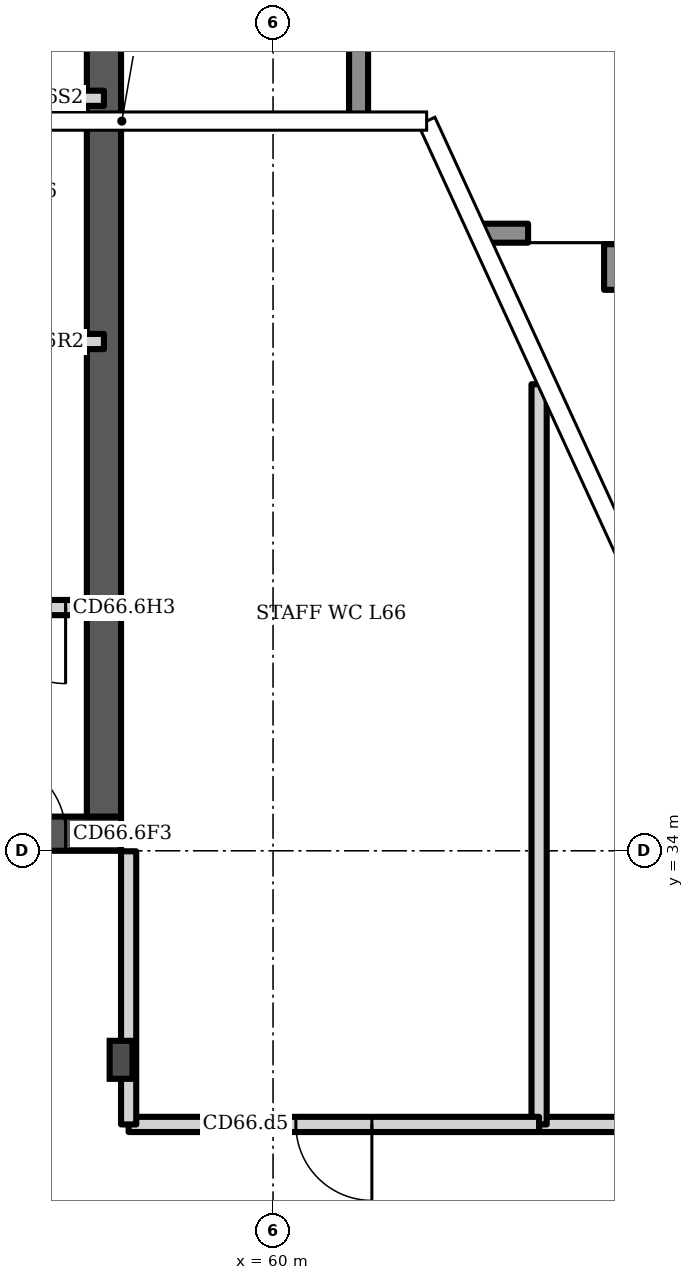
"""IFC4 building model, lengths in metres.
Left out: names, types, materials, properties, quantities, classifications, styles, units other than length and angle.
Written with IfcOpenShell. Run it as: python <this file> out.ifc"""

import sys

from ifc_helpers import new_model, si_unit, direction, frame, frame_2d, origin, origin_2d, place, context, subcontext, project, spatial, polyline, rectangle, i_section, outline, extrude, element, fill, save


model = new_model("IFC4")
c1 = context("Model", 3, precision=1e-05, world=origin(), true_north=direction((0.0, 1.0)))
c2 = subcontext(c1, "Body", "Model", "MODEL_VIEW")
j1 = project(units=[si_unit("LENGTHUNIT", "METRE"), si_unit("PLANEANGLEUNIT", "RADIAN")], contexts=[c1])
p1 = place(None, origin())
s1 = spatial("IfcSite", under=j1, at=p1, CompositionType="ELEMENT")
p2 = place(p1, origin())
s2 = spatial("IfcBuilding", under=s1, at=p2, CompositionType="ELEMENT")
p3 = place(p2, frame((0.0, 0.0, 261.1)))
s3 = spatial("IfcBuildingStorey", under=s2, at=p3, CompositionType="ELEMENT", Elevation=261.1)
p4 = place(p3, frame((23.0, 34.225, 0.0), z_axis=(0.0, 0.0, 1.0), x_axis=(1.0, 0.0, 0.0)))
e1 = element("IfcWall", 1, at=p4, inside=s3, PredefinedType="SHEAR", context=c2, shape_type="SweptSolid", body=[
    extrude(outline(polyline([(0.0, 0.0), (35.0, 0.0), (35.0, 3.2), (30.625, 3.2), (26.25, 3.2), (21.875, 3.2), (17.5, 3.2), (13.125, 3.2), (8.75, 3.2), (4.375, 3.2), (0.0, 2.365), (0.0, 0.0)])), frame((0.0, 0.225, 0.0), z_axis=(0.0, -1.0, 0.0), x_axis=(1.0, 0.0, 0.0)), (0.0, 0.0, 1.0), 0.45),
])
p5 = place(p4, frame((0.65, 0.0, 0.0)))
e2 = element("IfcOpeningElement", 2, at=p5, cuts=e1, PredefinedType="OPENING", context=c2, shape_type="SweptSolid", body=[
    extrude(rectangle(XDim=1.2, YDim=2.1, at=frame_2d((0.6, 1.05))), frame((0.0, 0.235, 0.0), z_axis=(0.0, -1.0, 0.0), x_axis=(1.0, 0.0, 0.0)), (0.0, 0.0, 1.0), 0.47),
])
p6 = place(p4, frame((7.679, 0.0, 0.0)))
e3 = element("IfcOpeningElement", 3, at=p6, cuts=e1, PredefinedType="OPENING", context=c2, shape_type="SweptSolid", body=[
    extrude(rectangle(XDim=1.1, YDim=2.1, at=frame_2d((0.55, 1.05))), frame((0.0, 0.235, 0.0), z_axis=(0.0, -1.0, 0.0), x_axis=(1.0, 0.0, 0.0)), (0.0, 0.0, 1.0), 0.47),
])
p7 = place(p4, frame((12.221, 0.0, 0.0)))
e4 = element("IfcOpeningElement", 4, at=p7, cuts=e1, PredefinedType="OPENING", context=c2, shape_type="SweptSolid", body=[
    extrude(rectangle(XDim=1.1, YDim=2.1, at=frame_2d((0.55, 1.05))), frame((0.0, 0.235, 0.0), z_axis=(0.0, -1.0, 0.0), x_axis=(1.0, 0.0, 0.0)), (0.0, 0.0, 1.0), 0.47),
])
p8 = place(p4, frame((9.8, 0.0, 0.0)))
e5 = element("IfcOpeningElement", 5, at=p8, cuts=e1, PredefinedType="OPENING", context=c2, shape_type="SweptSolid", body=[
    extrude(rectangle(XDim=1.4, YDim=2.1, at=frame_2d((0.7, 1.05))), frame((0.0, 0.235, 0.0), z_axis=(0.0, -1.0, 0.0), x_axis=(1.0, 0.0, 0.0)), (0.0, 0.0, 1.0), 0.47),
])
p9 = place(p4, frame((14.679, 0.0, 0.0)))
e6 = element("IfcOpeningElement", 6, at=p9, cuts=e1, PredefinedType="OPENING", context=c2, shape_type="SweptSolid", body=[
    extrude(rectangle(XDim=1.1, YDim=2.1, at=frame_2d((0.55, 1.05))), frame((0.0, 0.235, 0.0), z_axis=(0.0, -1.0, 0.0), x_axis=(1.0, 0.0, 0.0)), (0.0, 0.0, 1.0), 0.47),
])
p10 = place(p4, frame((19.221, 0.0, 0.0)))
e7 = element("IfcOpeningElement", 7, at=p10, cuts=e1, PredefinedType="OPENING", context=c2, shape_type="SweptSolid", body=[
    extrude(rectangle(XDim=1.1, YDim=2.1, at=frame_2d((0.55, 1.05))), frame((0.0, 0.235, 0.0), z_axis=(0.0, -1.0, 0.0), x_axis=(1.0, 0.0, 0.0)), (0.0, 0.0, 1.0), 0.47),
])
p11 = place(p4, frame((26.15, 0.0, 0.0)))
e8 = element("IfcOpeningElement", 8, at=p11, cuts=e1, PredefinedType="OPENING", context=c2, shape_type="SweptSolid", body=[
    extrude(rectangle(XDim=1.2, YDim=2.1, at=frame_2d((0.6, 1.05))), frame((0.0, 0.235, 0.0), z_axis=(0.0, -1.0, 0.0), x_axis=(1.0, 0.0, 0.0)), (0.0, 0.0, 1.0), 0.47),
])
p12 = place(p4, frame((28.729, 0.0, 0.0)))
e9 = element("IfcOpeningElement", 9, at=p12, cuts=e1, PredefinedType="OPENING", context=c2, shape_type="SweptSolid", body=[
    extrude(rectangle(XDim=1.0, YDim=2.1, at=frame_2d((0.5, 1.05))), frame((0.0, 0.235, 0.0), z_axis=(0.0, -1.0, 0.0), x_axis=(1.0, 0.0, 0.0)), (0.0, 0.0, 1.0), 0.47),
])
p13 = place(p4, frame((33.271, 0.0, 0.0)))
e10 = element("IfcOpeningElement", 10, at=p13, cuts=e1, PredefinedType="OPENING", context=c2, shape_type="SweptSolid", body=[
    extrude(rectangle(XDim=1.0, YDim=2.1, at=frame_2d((0.5, 1.05))), frame((0.0, 0.235, 0.0), z_axis=(0.0, -1.0, 0.0), x_axis=(1.0, 0.0, 0.0)), (0.0, 0.0, 1.0), 0.47),
])
p14 = place(p4, frame((30.8, 0.0, 0.0)))
e11 = element("IfcOpeningElement", 11, at=p14, cuts=e1, PredefinedType="OPENING", context=c2, shape_type="SweptSolid", body=[
    extrude(rectangle(XDim=1.4, YDim=2.1, at=frame_2d((0.7, 1.05))), frame((0.0, 0.235, 0.0), z_axis=(0.0, -1.0, 0.0), x_axis=(1.0, 0.0, 0.0)), (0.0, 0.0, 1.0), 0.47),
])
p15 = place(p3, frame((57.775, 34.45, 0.0), z_axis=(0.0, 0.0, 1.0), x_axis=(0.0, 1.0, 0.0)))
e12 = element("IfcWall", 12, at=p15, inside=s3, PredefinedType="SHEAR", context=c2, shape_type="SweptSolid", body=[
    extrude(rectangle(XDim=13.273, YDim=0.45, at=frame_2d((6.637, 0.0))), origin(), (0.0, 0.0, 1.0), 3.2),
])
p16 = place(p3, frame((58.0, 31.25, 0.0), z_axis=(0.0, 0.0, 1.0), x_axis=(1.0, 0.0, 0.0)))
e13 = element("IfcColumn", 13, at=p16, inside=s3, PredefinedType="COLUMN", context=c2, shape_type="SweptSolid", body=[
    extrude(i_section(OverallWidth=0.3, OverallDepth=0.5, WebThickness=0.014, FlangeThickness=0.028, FilletRadius=0.027, at=origin_2d()), origin(), (0.0, 0.0, 1.0), 3.2),
])
p17 = place(p3, frame((61.125, 48.504, 0.0), z_axis=(0.0, 0.0, 1.0), x_axis=(0.0, -1.0, 0.0)))
e14 = element("IfcWall", 14, at=p17, inside=s3, PredefinedType="PARAPET", context=c2, shape_type="SweptSolid", body=[
    extrude(rectangle(XDim=4.904, YDim=0.25, at=frame_2d((2.452, 0.0))), origin(), (0.0, 0.0, 1.0), 1.1),
])
p18 = place(p3, frame((62.755, 42.125, 0.0), z_axis=(0.0, 0.0, 1.0), x_axis=(1.0, 0.0, 0.0)))
e15 = element("IfcWall", 15, at=p18, inside=s3, PredefinedType="PARAPET", context=c2, shape_type="SweptSolid", body=[
    extrude(rectangle(XDim=0.6, YDim=0.25, at=frame_2d((0.3, 0.0))), origin(), (0.0, 0.0, 1.0), 1.1),
])
p19 = place(p3, frame((64.355, 41.68, 0.0), z_axis=(0.0, 0.0, 1.0), x_axis=(1.0, 0.0, 0.0)))
e16 = element("IfcWall", 16, at=p19, inside=s3, PredefinedType="SOLIDWALL", context=c2, shape_type="SweptSolid", body=[
    extrude(rectangle(XDim=4.254, YDim=0.6, at=frame_2d((2.127, 0.0))), origin(), (0.0, 0.0, 1.0), 0.8),
])
p20 = place(p3, frame((55.767, 37.2, 0.0), z_axis=(0.0, 0.0, 1.0), x_axis=(1.0, 0.0, 0.0)))
e17 = element("IfcWall", 17, at=p20, inside=s3, PredefinedType="PARTITIONING", context=c2, shape_type="SweptSolid", body=[
    extrude(rectangle(XDim=2.008, YDim=0.2, at=frame_2d((1.004, 0.0))), origin(), (0.0, 0.0, 1.0), 2.8),
])
p21 = place(p20, frame((0.504, 0.0, 0.0)))
e18 = element("IfcOpeningElement", 18, at=p21, cuts=e17, PredefinedType="OPENING", context=c2, shape_type="SweptSolid", body=[
    extrude(rectangle(XDim=1.0, YDim=2.1, at=frame_2d((0.5, 1.05))), frame((0.0, 0.11, 0.0), z_axis=(0.0, -1.0, 0.0), x_axis=(1.0, 0.0, 0.0)), (0.0, 0.0, 1.0), 0.22),
])
p22 = place(p3, frame((51.225, 40.7, 0.0), z_axis=(0.0, 0.0, 1.0), x_axis=(1.0, 0.0, 0.0)))
e19 = element("IfcWall", 19, at=p22, inside=s3, PredefinedType="PARTITIONING", context=c2, shape_type="SweptSolid", body=[
    extrude(rectangle(XDim=6.55, YDim=0.2, at=frame_2d((3.275, 0.0))), origin(), (0.0, 0.0, 1.0), 2.8),
])
p23 = place(p22, frame((3.879, 0.0, 0.0)))
e20 = element("IfcOpeningElement", 20, at=p23, cuts=e19, PredefinedType="OPENING", context=c2, shape_type="SweptSolid", body=[
    extrude(rectangle(XDim=1.0, YDim=2.1, at=frame_2d((0.5, 1.05))), frame((0.0, 0.11, 0.0), z_axis=(0.0, -1.0, 0.0), x_axis=(1.0, 0.0, 0.0)), (0.0, 0.0, 1.0), 0.22),
])
p24 = place(p3, frame((51.225, 43.9, 0.0), z_axis=(0.0, 0.0, 1.0), x_axis=(1.0, 0.0, 0.0)))
e21 = element("IfcWall", 21, at=p24, inside=s3, PredefinedType="PARTITIONING", context=c2, shape_type="SweptSolid", body=[
    extrude(rectangle(XDim=6.55, YDim=0.2, at=frame_2d((3.275, 0.0))), origin(), (0.0, 0.0, 1.0), 2.8),
])
p25 = place(p24, frame((3.879, 0.0, 0.0)))
e22 = element("IfcOpeningElement", 22, at=p25, cuts=e21, PredefinedType="OPENING", context=c2, shape_type="SweptSolid", body=[
    extrude(rectangle(XDim=1.0, YDim=2.1, at=frame_2d((0.5, 1.05))), frame((0.0, 0.11, 0.0), z_axis=(0.0, -1.0, 0.0), x_axis=(1.0, 0.0, 0.0)), (0.0, 0.0, 1.0), 0.22),
])
p26 = place(p3, frame((66.0, 30.4, 0.0), z_axis=(0.0, 0.0, 1.0), x_axis=(-1.0, 0.0, 0.0)))
e23 = element("IfcWall", 23, at=p26, inside=s3, PredefinedType="PARTITIONING", context=c2, shape_type="SweptSolid", body=[
    extrude(rectangle(XDim=2.5, YDim=0.2, at=frame_2d((1.25, 0.0))), origin(), (0.0, 0.0, 1.0), 2.8),
])
p27 = place(p3, frame((63.5, 30.4, 0.0), z_axis=(0.0, 0.0, 1.0), x_axis=(0.0, 1.0, 0.0)))
e24 = element("IfcWall", 24, at=p27, inside=s3, PredefinedType="PARTITIONING", context=c2, shape_type="SweptSolid", body=[
    extrude(rectangle(XDim=9.738, YDim=0.2, at=frame_2d((4.869, 0.0))), origin(), (0.0, 0.0, 1.0), 2.8),
])
p28 = place(p3, frame((63.5, 30.4, 0.0), z_axis=(0.0, 0.0, 1.0), x_axis=(-1.0, 0.0, 0.0)))
e25 = element("IfcWall", 25, at=p28, inside=s3, PredefinedType="PARTITIONING", context=c2, shape_type="SweptSolid", body=[
    extrude(rectangle(XDim=5.4, YDim=0.2, at=frame_2d((2.7, 0.0))), origin(), (0.0, 0.0, 1.0), 2.8),
])
p29 = place(p28, frame((2.2, 0.0, 0.0)))
e26 = element("IfcOpeningElement", 26, at=p29, cuts=e25, PredefinedType="OPENING", context=c2, shape_type="SweptSolid", body=[
    extrude(rectangle(XDim=1.0, YDim=2.1, at=frame_2d((0.5, 1.05))), frame((0.0, 0.11, 0.0), z_axis=(0.0, -1.0, 0.0), x_axis=(1.0, 0.0, 0.0)), (0.0, 0.0, 1.0), 0.22),
])
p30 = place(p3, frame((58.1, 30.4, 0.0), z_axis=(0.0, 0.0, 1.0), x_axis=(0.0, 1.0, 0.0)))
e27 = element("IfcWall", 27, at=p30, inside=s3, PredefinedType="PARTITIONING", context=c2, shape_type="SweptSolid", body=[
    extrude(rectangle(XDim=3.594, YDim=0.2, at=frame_2d((1.797, 0.0))), origin(), (0.0, 0.0, 1.0), 2.8),
])
p31 = place(p13, origin())
e28 = element("IfcDoor", 28, at=p31, inside=s3, OperationType="SINGLE_SWING_LEFT", PredefinedType="DOOR", context=c2, shape_type="SweptSolid", body=[
    extrude(rectangle(XDim=1.0, YDim=2.1, at=frame_2d((0.5, 1.05))), frame((0.0, 0.025, 0.0), z_axis=(0.0, -1.0, 0.0), x_axis=(1.0, 0.0, 0.0)), (0.0, 0.0, 1.0), 0.05),
])
fill(e10, e28)
p32 = place(p21, origin())
e29 = element("IfcDoor", 29, at=p32, inside=s3, OperationType="SINGLE_SWING_RIGHT", PredefinedType="DOOR", context=c2, shape_type="SweptSolid", body=[
    extrude(rectangle(XDim=1.0, YDim=2.1, at=frame_2d((0.5, 1.05))), frame((0.0, 0.025, 0.0), z_axis=(0.0, -1.0, 0.0), x_axis=(1.0, 0.0, 0.0)), (0.0, 0.0, 1.0), 0.05),
])
fill(e18, e29)
p33 = place(p29, origin())
e30 = element("IfcDoor", 30, at=p33, inside=s3, OperationType="SINGLE_SWING_LEFT", PredefinedType="DOOR", context=c2, shape_type="SweptSolid", body=[
    extrude(rectangle(XDim=1.0, YDim=2.1, at=frame_2d((0.5, 1.05))), frame((0.0, 0.025, 0.0), z_axis=(0.0, -1.0, 0.0), x_axis=(1.0, 0.0, 0.0)), (0.0, 0.0, 1.0), 0.05),
])
fill(e26, e30)
save(model, sys.argv[1])
